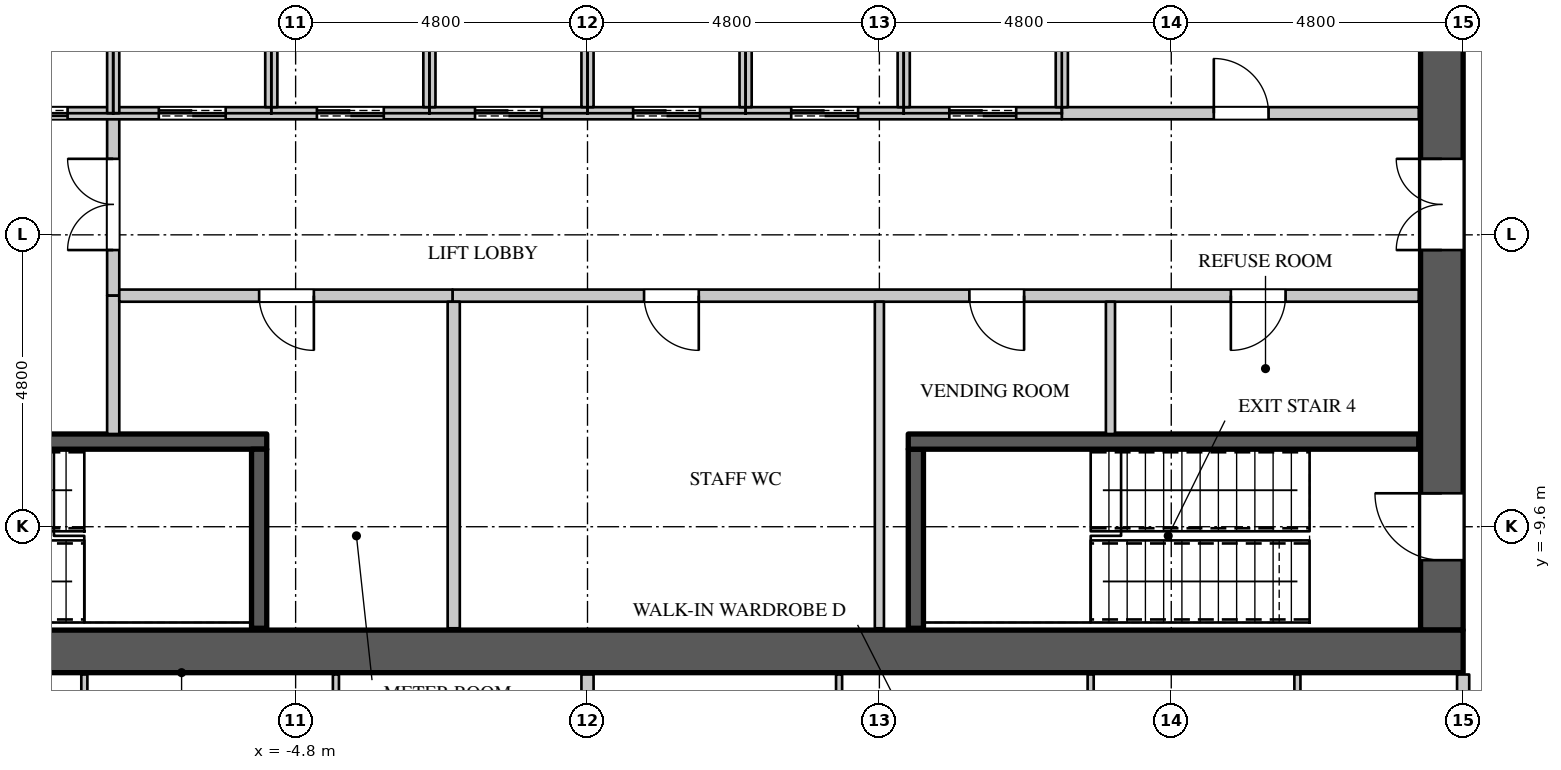
"""IFC4 building model, lengths in metres.
Left out: names, types, materials, properties, quantities, classifications, styles, units other than length and angle.
Written with IfcOpenShell. Run it as: python <this file> out.ifc"""

import sys

from ifc_helpers import new_model, si_unit, direction, frame, frame_2d, origin, place, context, subcontext, project, spatial, rectangle, extrude, element, fill, save


model = new_model("IFC4")
c1 = context("Model", 3, precision=1e-05, world=origin(), true_north=direction((0.0, 1.0)))
c2 = subcontext(c1, "Body", "Model", "MODEL_VIEW")
j1 = project(units=[si_unit("LENGTHUNIT", "METRE"), si_unit("PLANEANGLEUNIT", "RADIAN")], contexts=[c1])
p1 = place(None, origin())
s1 = spatial("IfcSite", under=j1, at=p1, CompositionType="ELEMENT")
p2 = place(p1, origin())
s2 = spatial("IfcBuilding", under=s1, at=p2, CompositionType="ELEMENT")
p3 = place(p2, frame((0.0, 0.0, 162.3)))
s3 = spatial("IfcBuildingStorey", under=s2, at=p3, CompositionType="ELEMENT", Elevation=162.3)
p4 = place(p3, frame((-14.4, -11.65, 0.0), z_axis=(0.0, 0.0, 1.0), x_axis=(1.0, 0.0, 0.0)))
e1 = element("IfcWall", 1, at=p4, inside=s3, PredefinedType="SHEAR", context=c2, shape_type="SweptSolid", body=[
    extrude(rectangle(XDim=28.8, YDim=0.7, at=frame_2d((14.4, 0.0))), origin(), (0.0, 0.0, 1.0), 4.2),
])
p5 = place(p3, frame((14.05, -11.3, 0.0), z_axis=(0.0, 0.0, 1.0), x_axis=(0.0, 1.0, 0.0)))
e2 = element("IfcWall", 2, at=p5, inside=s3, PredefinedType="SHEAR", context=c2, shape_type="SweptSolid", body=[
    extrude(rectangle(XDim=22.6, YDim=0.7, at=frame_2d((11.3, 0.0))), origin(), (0.0, 0.0, 1.0), 4.2),
])
p6 = place(p5, frame((20.35, 0.0, 0.0)))
e3 = element("IfcOpeningElement", 3, at=p6, cuts=e2, PredefinedType="OPENING", context=c2, shape_type="SweptSolid", body=[
    extrude(rectangle(XDim=1.1, YDim=2.2, at=frame_2d((0.55, 1.1))), frame((0.0, 0.36, 0.0), z_axis=(0.0, -1.0, 0.0), x_axis=(1.0, 0.0, 0.0)), (0.0, 0.0, 1.0), 0.72),
])
p7 = place(p5, frame((1.15, 0.0, 0.0)))
e4 = element("IfcOpeningElement", 4, at=p7, cuts=e2, PredefinedType="OPENING", context=c2, shape_type="SweptSolid", body=[
    extrude(rectangle(XDim=1.1, YDim=2.2, at=frame_2d((0.55, 1.1))), frame((0.0, 0.36, 0.0), z_axis=(0.0, -1.0, 0.0), x_axis=(1.0, 0.0, 0.0)), (0.0, 0.0, 1.0), 0.72),
])
p8 = place(p5, frame((14.85, 0.0, 0.0)))
e5 = element("IfcOpeningElement", 5, at=p8, cuts=e2, PredefinedType="OPENING", context=c2, shape_type="SweptSolid", body=[
    extrude(rectangle(XDim=1.5, YDim=2.4, at=frame_2d((0.75, 1.2))), frame((0.0, 0.36, 0.0), z_axis=(0.0, -1.0, 0.0), x_axis=(1.0, 0.0, 0.0)), (0.0, 0.0, 1.0), 0.72),
])
p9 = place(p5, frame((6.25, 0.0, 0.0)))
e6 = element("IfcOpeningElement", 6, at=p9, cuts=e2, PredefinedType="OPENING", context=c2, shape_type="SweptSolid", body=[
    extrude(rectangle(XDim=1.5, YDim=2.4, at=frame_2d((0.75, 1.2))), frame((0.0, 0.36, 0.0), z_axis=(0.0, -1.0, 0.0), x_axis=(1.0, 0.0, 0.0)), (0.0, 0.0, 1.0), 0.72),
])
p10 = place(p3, frame((-7.8, -5.8, 0.0), z_axis=(0.0, 0.0, 1.0), x_axis=(0.0, 1.0, 0.0)))
e7 = element("IfcWall", 7, at=p10, inside=s3, PredefinedType="PARTITIONING", context=c2, shape_type="SweptSolid", body=[
    extrude(rectangle(XDim=3.0, YDim=0.2, at=frame_2d((1.5, 0.0))), origin(), (0.0, 0.0, 1.0), 3.95),
])
p11 = place(p10, frame((0.75, 0.0, 0.0)))
e8 = element("IfcOpeningElement", 8, at=p11, cuts=e7, PredefinedType="OPENING", context=c2, shape_type="SweptSolid", body=[
    extrude(rectangle(XDim=1.5, YDim=2.4, at=frame_2d((0.75, 1.2))), frame((0.0, 0.11, 0.0), z_axis=(0.0, -1.0, 0.0), x_axis=(1.0, 0.0, 0.0)), (0.0, 0.0, 1.0), 0.22),
])
p12 = place(p3, frame((-2.22, -5.8, 0.0), z_axis=(0.0, 0.0, 1.0), x_axis=(1.0, 0.0, 0.0)))
e9 = element("IfcWall", 9, at=p12, inside=s3, PredefinedType="PARTITIONING", context=c2, shape_type="SweptSolid", body=[
    extrude(rectangle(XDim=15.89, YDim=0.2, at=frame_2d((7.945, 0.0))), origin(), (0.0, 0.0, 1.0), 3.95),
])
p13 = place(p12, frame((3.15, 0.0, 0.0)))
e10 = element("IfcOpeningElement", 10, at=p13, cuts=e9, PredefinedType="OPENING", context=c2, shape_type="SweptSolid", body=[
    extrude(rectangle(XDim=0.9, YDim=2.2, at=frame_2d((0.45, 1.1))), frame((0.0, 0.11, 0.0), z_axis=(0.0, -1.0, 0.0), x_axis=(1.0, 0.0, 0.0)), (0.0, 0.0, 1.0), 0.22),
])
p14 = place(p12, frame((8.5, 0.0, 0.0)))
e11 = element("IfcOpeningElement", 11, at=p14, cuts=e9, PredefinedType="OPENING", context=c2, shape_type="SweptSolid", body=[
    extrude(rectangle(XDim=0.9, YDim=2.2, at=frame_2d((0.45, 1.1))), frame((0.0, 0.11, 0.0), z_axis=(0.0, -1.0, 0.0), x_axis=(1.0, 0.0, 0.0)), (0.0, 0.0, 1.0), 0.22),
])
p15 = place(p12, frame((12.8, 0.0, 0.0)))
e12 = element("IfcOpeningElement", 12, at=p15, cuts=e9, PredefinedType="OPENING", context=c2, shape_type="SweptSolid", body=[
    extrude(rectangle(XDim=0.9, YDim=2.2, at=frame_2d((0.45, 1.1))), frame((0.0, 0.11, 0.0), z_axis=(0.0, -1.0, 0.0), x_axis=(1.0, 0.0, 0.0)), (0.0, 0.0, 1.0), 0.22),
])
p16 = place(p3, frame((14.4, -14.3, 0.0), z_axis=(0.0, 0.0, 1.0), x_axis=(0.0, 1.0, 0.0)))
e13 = element("IfcWall", 13, at=p16, inside=s3, PredefinedType="PARTITIONING", context=c2, shape_type="SweptSolid", body=[
    extrude(rectangle(XDim=2.27, YDim=0.2, at=frame_2d((1.135, 0.0))), origin(), (0.0, 0.0, 1.0), 3.95),
])
p17 = place(p3, frame((4.8, -11.27, 0.0), z_axis=(0.0, 0.0, 1.0), x_axis=(0.0, 1.0, 0.0)))
e14 = element("IfcWall", 14, at=p17, inside=s3, PredefinedType="PARTITIONING", context=c2, shape_type="SweptSolid", body=[
    extrude(rectangle(XDim=5.37, YDim=0.15, at=frame_2d((2.685, 0.0))), origin(), (0.0, 0.0, 1.0), 3.95),
])
p18 = place(p3, frame((8.6, -8.075, 0.0), z_axis=(0.0, 0.0, 1.0), x_axis=(0.0, 1.0, 0.0)))
e15 = element("IfcWall", 15, at=p18, inside=s3, PredefinedType="PARTITIONING", context=c2, shape_type="SweptSolid", body=[
    extrude(rectangle(XDim=2.175, YDim=0.15, at=frame_2d((1.087, 0.0))), origin(), (0.0, 0.0, 1.0), 3.95),
])
p19 = place(p3, frame((0.0, -24.055, 0.0), z_axis=(0.0, 0.0, 1.0), x_axis=(0.0, 1.0, 0.0)))
e16 = element("IfcWall", 16, at=p19, inside=s3, PredefinedType="PARTITIONING", context=c2, shape_type="SweptSolid", body=[
    extrude(rectangle(XDim=12.025, YDim=0.2, at=frame_2d((6.012, 0.0))), origin(), (0.0, 0.0, 1.0), 3.95),
])
p20 = place(p3, frame((-7.8, -8.075, 0.0), z_axis=(0.0, 0.0, 1.0), x_axis=(0.0, 1.0, 0.0)))
e17 = element("IfcWall", 17, at=p20, inside=s3, PredefinedType="PARTITIONING", context=c2, shape_type="SweptSolid", body=[
    extrude(rectangle(XDim=2.275, YDim=0.2, at=frame_2d((1.137, 0.0))), origin(), (0.0, 0.0, 1.0), 3.95),
])
p21 = place(p3, frame((-7.7, -5.8, 0.0), z_axis=(0.0, 0.0, 1.0), x_axis=(1.0, 0.0, 0.0)))
e18 = element("IfcWall", 18, at=p21, inside=s3, PredefinedType="PARTITIONING", context=c2, shape_type="SweptSolid", body=[
    extrude(rectangle(XDim=5.48, YDim=0.2, at=frame_2d((2.74, 0.0))), origin(), (0.0, 0.0, 1.0), 3.95),
])
p22 = place(p21, frame((2.3, 0.0, 0.0)))
e19 = element("IfcOpeningElement", 19, at=p22, cuts=e18, PredefinedType="OPENING", context=c2, shape_type="SweptSolid", body=[
    extrude(rectangle(XDim=0.9, YDim=2.2, at=frame_2d((0.45, 1.1))), frame((0.0, 0.11, 0.0), z_axis=(0.0, -1.0, 0.0), x_axis=(1.0, 0.0, 0.0)), (0.0, 0.0, 1.0), 0.22),
])
p23 = place(p3, frame((-2.2, -11.27, 0.0), z_axis=(0.0, 0.0, 1.0), x_axis=(0.0, 1.0, 0.0)))
e20 = element("IfcWall", 20, at=p23, inside=s3, PredefinedType="PARTITIONING", context=c2, shape_type="SweptSolid", body=[
    extrude(rectangle(XDim=5.37, YDim=0.2, at=frame_2d((2.685, 0.0))), origin(), (0.0, 0.0, 1.0), 3.95),
])
p24 = place(p3, frame((7.8, -2.8, 0.0), z_axis=(0.0, 0.0, 1.0), x_axis=(1.0, 0.0, 0.0)))
e21 = element("IfcWall", 21, at=p24, inside=s3, PredefinedType="PARTITIONING", context=c2, shape_type="SweptSolid", body=[
    extrude(rectangle(XDim=5.87, YDim=0.2, at=frame_2d((2.935, 0.0))), origin(), (0.0, 0.0, 1.0), 3.95),
])
p25 = place(p24, frame((2.5, 0.0, 0.0)))
e22 = element("IfcOpeningElement", 22, at=p25, cuts=e21, PredefinedType="OPENING", context=c2, shape_type="SweptSolid", body=[
    extrude(rectangle(XDim=0.9, YDim=2.2, at=frame_2d((0.45, 1.1))), frame((0.0, 0.11, 0.0), z_axis=(0.0, -1.0, 0.0), x_axis=(1.0, 0.0, 0.0)), (0.0, 0.0, 1.0), 0.22),
])
p26 = place(p3, frame((-10.4, -2.8, 0.0), z_axis=(0.0, 0.0, 1.0), x_axis=(1.0, 0.0, 0.0)))
e23 = element("IfcWall", 23, at=p26, inside=s3, PredefinedType="PARTITIONING", context=c2, shape_type="SweptSolid", body=[
    extrude(rectangle(XDim=18.2, YDim=0.2, at=frame_2d((9.1, 0.0))), origin(), (0.0, 0.0, 1.0), 3.95),
])
p27 = place(p26, frame((0.75, 0.0, 0.0)))
e24 = element("IfcOpeningElement", 24, at=p27, cuts=e23, PredefinedType="OPENING", context=c2, shape_type="SweptSolid", body=[
    extrude(rectangle(XDim=1.1, YDim=2.2, at=frame_2d((0.55, 1.1))), frame((0.0, 0.11, 0.0), z_axis=(0.0, -1.0, 0.0), x_axis=(1.0, 0.0, 0.0)), (0.0, 0.0, 1.0), 0.22),
])
p28 = place(p26, frame((3.35, 0.0, 0.0)))
e25 = element("IfcOpeningElement", 25, at=p28, cuts=e23, PredefinedType="OPENING", context=c2, shape_type="SweptSolid", body=[
    extrude(rectangle(XDim=1.1, YDim=2.2, at=frame_2d((0.55, 1.1))), frame((0.0, 0.11, 0.0), z_axis=(0.0, -1.0, 0.0), x_axis=(1.0, 0.0, 0.0)), (0.0, 0.0, 1.0), 0.22),
])
p29 = place(p26, frame((5.95, 0.0, 0.0)))
e26 = element("IfcOpeningElement", 26, at=p29, cuts=e23, PredefinedType="OPENING", context=c2, shape_type="SweptSolid", body=[
    extrude(rectangle(XDim=1.1, YDim=2.2, at=frame_2d((0.55, 1.1))), frame((0.0, 0.11, 0.0), z_axis=(0.0, -1.0, 0.0), x_axis=(1.0, 0.0, 0.0)), (0.0, 0.0, 1.0), 0.22),
])
p30 = place(p26, frame((8.55, 0.0, 0.0)))
e27 = element("IfcOpeningElement", 27, at=p30, cuts=e23, PredefinedType="OPENING", context=c2, shape_type="SweptSolid", body=[
    extrude(rectangle(XDim=1.1, YDim=2.2, at=frame_2d((0.55, 1.1))), frame((0.0, 0.11, 0.0), z_axis=(0.0, -1.0, 0.0), x_axis=(1.0, 0.0, 0.0)), (0.0, 0.0, 1.0), 0.22),
])
p31 = place(p26, frame((11.15, 0.0, 0.0)))
e28 = element("IfcOpeningElement", 28, at=p31, cuts=e23, PredefinedType="OPENING", context=c2, shape_type="SweptSolid", body=[
    extrude(rectangle(XDim=1.1, YDim=2.2, at=frame_2d((0.55, 1.1))), frame((0.0, 0.11, 0.0), z_axis=(0.0, -1.0, 0.0), x_axis=(1.0, 0.0, 0.0)), (0.0, 0.0, 1.0), 0.22),
])
p32 = place(p26, frame((13.75, 0.0, 0.0)))
e29 = element("IfcOpeningElement", 29, at=p32, cuts=e23, PredefinedType="OPENING", context=c2, shape_type="SweptSolid", body=[
    extrude(rectangle(XDim=1.1, YDim=2.2, at=frame_2d((0.55, 1.1))), frame((0.0, 0.11, 0.0), z_axis=(0.0, -1.0, 0.0), x_axis=(1.0, 0.0, 0.0)), (0.0, 0.0, 1.0), 0.22),
])
p33 = place(p26, frame((16.35, 0.0, 0.0)))
e30 = element("IfcOpeningElement", 30, at=p33, cuts=e23, PredefinedType="OPENING", context=c2, shape_type="SweptSolid", body=[
    extrude(rectangle(XDim=1.1, YDim=2.2, at=frame_2d((0.55, 1.1))), frame((0.0, 0.11, 0.0), z_axis=(0.0, -1.0, 0.0), x_axis=(1.0, 0.0, 0.0)), (0.0, 0.0, 1.0), 0.22),
])
p34 = place(p3, frame((-7.8, -2.8, 0.0), z_axis=(0.0, 0.0, 1.0), x_axis=(0.0, 1.0, 0.0)))
e31 = element("IfcWall", 31, at=p34, inside=s3, PredefinedType="PARTITIONING", context=c2, shape_type="SweptSolid", body=[
    extrude(rectangle(XDim=2.8, YDim=0.2, at=frame_2d((1.4, 0.0))), origin(), (0.0, 0.0, 1.0), 3.95),
])
for number, where, z_axis, x_axis in (
    (32, (-5.2, -2.7, 0.0), (0.0, 0.0, 1.0), (0.0, 1.0, 0.0)),
    (33, (-2.6, -2.7, 0.0), (0.0, 0.0, 1.0), (0.0, 1.0, 0.0)),
    (34, (0.0, -2.7, 0.0), (0.0, 0.0, 1.0), (0.0, 1.0, 0.0)),
    (35, (2.6, -2.7, 0.0), (0.0, 0.0, 1.0), (0.0, 1.0, 0.0)),
    (36, (5.2, -2.7, 0.0), (0.0, 0.0, 1.0), (0.0, 1.0, 0.0)),
    (37, (7.8, -2.7, 0.0), (0.0, 0.0, 1.0), (0.0, 1.0, 0.0)),
):
    element("IfcWall", number, at=place(p3, frame(where, z_axis=z_axis, x_axis=x_axis)), inside=s3, PredefinedType="PARTITIONING", context=c2, shape_type="SweptSolid", body=[
        extrude(rectangle(XDim=2.6, YDim=0.2, at=frame_2d((1.3, 0.0))), origin(), (0.0, 0.0, 1.0), 3.95),
    ])
p35 = place(p3, frame((-13.67, -8.2, 0.0), z_axis=(0.0, 0.0, 1.0), x_axis=(1.0, 0.0, 0.0)))
e38 = element("IfcWall", 38, at=p35, inside=s3, PredefinedType="SHEAR", context=c2, shape_type="SweptSolid", body=[
    extrude(rectangle(XDim=8.395, YDim=0.25, at=frame_2d((4.198, 0.0))), origin(), (0.0, 0.0, 1.0), 3.95),
])
p36 = place(p35, frame((0.15, 0.0, 0.0)))
e39 = element("IfcOpeningElement", 39, at=p36, cuts=e38, PredefinedType="OPENING", context=c2, shape_type="SweptSolid", body=[
    extrude(rectangle(XDim=1.1, YDim=2.2, at=frame_2d((0.55, 1.1))), frame((0.0, 0.135, 0.0), z_axis=(0.0, -1.0, 0.0), x_axis=(1.0, 0.0, 0.0)), (0.0, 0.0, 1.0), 0.27),
])
for number, where, z_axis, x_axis in (
    (40, (-5.4, -11.27, 0.0), (0.0, 0.0, 1.0), (0.0, 1.0, 0.0)),
    (41, (5.4, -11.27, 0.0), (0.0, 0.0, 1.0), (0.0, 1.0, 0.0)),
):
    element("IfcWall", number, at=place(p3, frame(where, z_axis=z_axis, x_axis=x_axis)), inside=s3, PredefinedType="SHEAR", context=c2, shape_type="SweptSolid", body=[
        extrude(rectangle(XDim=2.945, YDim=0.25, at=frame_2d((1.473, 0.0))), origin(), (0.0, 0.0, 1.0), 3.95),
    ])
p37 = place(p3, frame((5.275, -8.2, 0.0), z_axis=(0.0, 0.0, 1.0), x_axis=(1.0, 0.0, 0.0)))
e42 = element("IfcWall", 42, at=p37, inside=s3, PredefinedType="SHEAR", context=c2, shape_type="SweptSolid", body=[
    extrude(rectangle(XDim=8.395, YDim=0.25, at=frame_2d((4.198, 0.0))), origin(), (0.0, 0.0, 1.0), 3.95),
])
p38 = place(p3, frame((-8.274, -14.98, 0.0), z_axis=(0.0, 0.0, 1.0), x_axis=(0.0, 1.0, 0.0)))
e43 = element("IfcWall", 43, at=p38, inside=s3, PredefinedType="PARTITIONING", context=c2, shape_type="SweptSolid", body=[
    extrude(rectangle(XDim=2.95, YDim=0.1, at=frame_2d((1.475, 0.0))), origin(), (0.0, 0.0, 1.0), 3.95),
])
for number, where, z_axis, x_axis in (
    (44, (-4.137, -17.325, 0.0), (0.0, 0.0, 1.0), (0.0, 1.0, 0.0)),
    (45, (4.137, -17.325, 0.0), (0.0, 0.0, 1.0), (0.0, 1.0, 0.0)),
):
    element("IfcWall", number, at=place(p3, frame(where, z_axis=z_axis, x_axis=x_axis)), inside=s3, PredefinedType="PARTITIONING", context=c2, shape_type="SweptSolid", body=[
        extrude(rectangle(XDim=5.295, YDim=0.1, at=frame_2d((2.647, 0.0))), origin(), (0.0, 0.0, 1.0), 3.35),
    ])
p39 = place(p3, frame((8.274, -14.98, 0.0), z_axis=(0.0, 0.0, 1.0), x_axis=(0.0, 1.0, 0.0)))
e46 = element("IfcWall", 46, at=p39, inside=s3, PredefinedType="PARTITIONING", context=c2, shape_type="SweptSolid", body=[
    extrude(rectangle(XDim=2.95, YDim=0.1, at=frame_2d((1.475, 0.0))), origin(), (0.0, 0.0, 1.0), 3.95),
])
p40 = place(p3, frame((11.675, -14.925, 0.0), z_axis=(0.0, 0.0, 1.0), x_axis=(0.0, 1.0, 0.0)))
e47 = element("IfcWall", 47, at=p40, inside=s3, PredefinedType="PARTITIONING", context=c2, shape_type="SweptSolid", body=[
    extrude(rectangle(XDim=2.895, YDim=0.1, at=frame_2d((1.448, 0.0))), origin(), (0.0, 0.0, 1.0), 3.95),
])
p41 = place(p40, frame((0.95, 0.0, 0.0)))
e48 = element("IfcOpeningElement", 48, at=p41, cuts=e47, PredefinedType="OPENING", context=c2, shape_type="SweptSolid", body=[
    extrude(rectangle(XDim=0.9, YDim=2.2, at=frame_2d((0.45, 1.1))), frame((0.0, 0.06, 0.0), z_axis=(0.0, -1.0, 0.0), x_axis=(1.0, 0.0, 0.0)), (0.0, 0.0, 1.0), 0.12),
])
p42 = place(p25, origin())
e49 = element("IfcDoor", 49, at=p42, inside=s3, OperationType="SINGLE_SWING_LEFT", PredefinedType="DOOR", context=c2, shape_type="SweptSolid", body=[
    extrude(rectangle(XDim=0.9, YDim=2.2, at=frame_2d((0.45, 1.1))), frame((0.0, 0.025, 0.0), z_axis=(0.0, -1.0, 0.0), x_axis=(1.0, 0.0, 0.0)), (0.0, 0.0, 1.0), 0.05),
])
fill(e22, e49)
p43 = place(p22, origin())
e50 = element("IfcDoor", 50, at=p43, inside=s3, OperationType="SINGLE_SWING_LEFT", PredefinedType="DOOR", context=c2, shape_type="SweptSolid", body=[
    extrude(rectangle(XDim=0.9, YDim=2.2, at=frame_2d((0.45, 1.1))), frame((0.0, 0.025, 0.0), z_axis=(0.0, -1.0, 0.0), x_axis=(1.0, 0.0, 0.0)), (0.0, 0.0, 1.0), 0.05),
])
fill(e19, e50)
p44 = place(p13, origin())
e51 = element("IfcDoor", 51, at=p44, inside=s3, OperationType="SINGLE_SWING_LEFT", PredefinedType="DOOR", context=c2, shape_type="SweptSolid", body=[
    extrude(rectangle(XDim=0.9, YDim=2.2, at=frame_2d((0.45, 1.1))), frame((0.0, 0.025, 0.0), z_axis=(0.0, -1.0, 0.0), x_axis=(1.0, 0.0, 0.0)), (0.0, 0.0, 1.0), 0.05),
])
fill(e10, e51)
p45 = place(p14, origin())
e52 = element("IfcDoor", 52, at=p45, inside=s3, OperationType="SINGLE_SWING_LEFT", PredefinedType="DOOR", context=c2, shape_type="SweptSolid", body=[
    extrude(rectangle(XDim=0.9, YDim=2.2, at=frame_2d((0.45, 1.1))), frame((0.0, 0.025, 0.0), z_axis=(0.0, -1.0, 0.0), x_axis=(1.0, 0.0, 0.0)), (0.0, 0.0, 1.0), 0.05),
])
fill(e11, e52)
p46 = place(p15, origin())
e53 = element("IfcDoor", 53, at=p46, inside=s3, OperationType="SINGLE_SWING_RIGHT", PredefinedType="DOOR", context=c2, shape_type="SweptSolid", body=[
    extrude(rectangle(XDim=0.9, YDim=2.2, at=frame_2d((0.45, 1.1))), frame((0.0, 0.025, 0.0), z_axis=(0.0, -1.0, 0.0), x_axis=(1.0, 0.0, 0.0)), (0.0, 0.0, 1.0), 0.05),
])
fill(e12, e53)
p47 = place(p27, origin())
e54 = element("IfcDoor", 54, at=p47, inside=s3, OperationType="DOUBLE_DOOR_SLIDING", PredefinedType="DOOR", context=c2, shape_type="SweptSolid", body=[
    extrude(rectangle(XDim=1.1, YDim=2.2, at=frame_2d((0.55, 1.1))), frame((0.0, 0.025, 0.0), z_axis=(0.0, -1.0, 0.0), x_axis=(1.0, 0.0, 0.0)), (0.0, 0.0, 1.0), 0.05),
])
fill(e24, e54)
p48 = place(p28, origin())
e55 = element("IfcDoor", 55, at=p48, inside=s3, OperationType="DOUBLE_DOOR_SLIDING", PredefinedType="DOOR", context=c2, shape_type="SweptSolid", body=[
    extrude(rectangle(XDim=1.1, YDim=2.2, at=frame_2d((0.55, 1.1))), frame((0.0, 0.025, 0.0), z_axis=(0.0, -1.0, 0.0), x_axis=(1.0, 0.0, 0.0)), (0.0, 0.0, 1.0), 0.05),
])
fill(e25, e55)
p49 = place(p29, origin())
e56 = element("IfcDoor", 56, at=p49, inside=s3, OperationType="DOUBLE_DOOR_SLIDING", PredefinedType="DOOR", context=c2, shape_type="SweptSolid", body=[
    extrude(rectangle(XDim=1.1, YDim=2.2, at=frame_2d((0.55, 1.1))), frame((0.0, 0.025, 0.0), z_axis=(0.0, -1.0, 0.0), x_axis=(1.0, 0.0, 0.0)), (0.0, 0.0, 1.0), 0.05),
])
fill(e26, e56)
p50 = place(p30, origin())
e57 = element("IfcDoor", 57, at=p50, inside=s3, OperationType="DOUBLE_DOOR_SLIDING", PredefinedType="DOOR", context=c2, shape_type="SweptSolid", body=[
    extrude(rectangle(XDim=1.1, YDim=2.2, at=frame_2d((0.55, 1.1))), frame((0.0, 0.025, 0.0), z_axis=(0.0, -1.0, 0.0), x_axis=(1.0, 0.0, 0.0)), (0.0, 0.0, 1.0), 0.05),
])
fill(e27, e57)
p51 = place(p31, origin())
e58 = element("IfcDoor", 58, at=p51, inside=s3, OperationType="DOUBLE_DOOR_SLIDING", PredefinedType="DOOR", context=c2, shape_type="SweptSolid", body=[
    extrude(rectangle(XDim=1.1, YDim=2.2, at=frame_2d((0.55, 1.1))), frame((0.0, 0.025, 0.0), z_axis=(0.0, -1.0, 0.0), x_axis=(1.0, 0.0, 0.0)), (0.0, 0.0, 1.0), 0.05),
])
fill(e28, e58)
p52 = place(p32, origin())
e59 = element("IfcDoor", 59, at=p52, inside=s3, OperationType="DOUBLE_DOOR_SLIDING", PredefinedType="DOOR", context=c2, shape_type="SweptSolid", body=[
    extrude(rectangle(XDim=1.1, YDim=2.2, at=frame_2d((0.55, 1.1))), frame((0.0, 0.025, 0.0), z_axis=(0.0, -1.0, 0.0), x_axis=(1.0, 0.0, 0.0)), (0.0, 0.0, 1.0), 0.05),
])
fill(e29, e59)
p53 = place(p33, origin())
e60 = element("IfcDoor", 60, at=p53, inside=s3, OperationType="DOUBLE_DOOR_SLIDING", PredefinedType="DOOR", context=c2, shape_type="SweptSolid", body=[
    extrude(rectangle(XDim=1.1, YDim=2.2, at=frame_2d((0.55, 1.1))), frame((0.0, 0.025, 0.0), z_axis=(0.0, -1.0, 0.0), x_axis=(1.0, 0.0, 0.0)), (0.0, 0.0, 1.0), 0.05),
])
fill(e30, e60)
p54 = place(p11, origin())
e61 = element("IfcDoor", 61, at=p54, inside=s3, OperationType="DOUBLE_DOOR_SINGLE_SWING", PredefinedType="DOOR", context=c2, shape_type="SweptSolid", body=[
    extrude(rectangle(XDim=1.5, YDim=2.4, at=frame_2d((0.75, 1.2))), frame((0.0, 0.025, 0.0), z_axis=(0.0, -1.0, 0.0), x_axis=(1.0, 0.0, 0.0)), (0.0, 0.0, 1.0), 0.05),
])
fill(e8, e61)
p55 = place(p7, origin())
e62 = element("IfcDoor", 62, at=p55, inside=s3, OperationType="SINGLE_SWING_RIGHT", PredefinedType="DOOR", context=c2, shape_type="SweptSolid", body=[
    extrude(rectangle(XDim=1.1, YDim=2.2, at=frame_2d((0.55, 1.1))), frame((0.0, 0.345, 0.0), z_axis=(0.0, -1.0, 0.0), x_axis=(1.0, 0.0, 0.0)), (0.0, 0.0, 1.0), 0.05),
])
fill(e4, e62)
p56 = place(p9, origin())
e63 = element("IfcDoor", 63, at=p56, inside=s3, OperationType="DOUBLE_DOOR_SINGLE_SWING", PredefinedType="DOOR", context=c2, shape_type="SweptSolid", body=[
    extrude(rectangle(XDim=1.5, YDim=2.4, at=frame_2d((0.75, 1.2))), frame((0.0, 0.345, 0.0), z_axis=(0.0, -1.0, 0.0), x_axis=(1.0, 0.0, 0.0)), (0.0, 0.0, 1.0), 0.05),
])
fill(e6, e63)
save(model, sys.argv[1])
